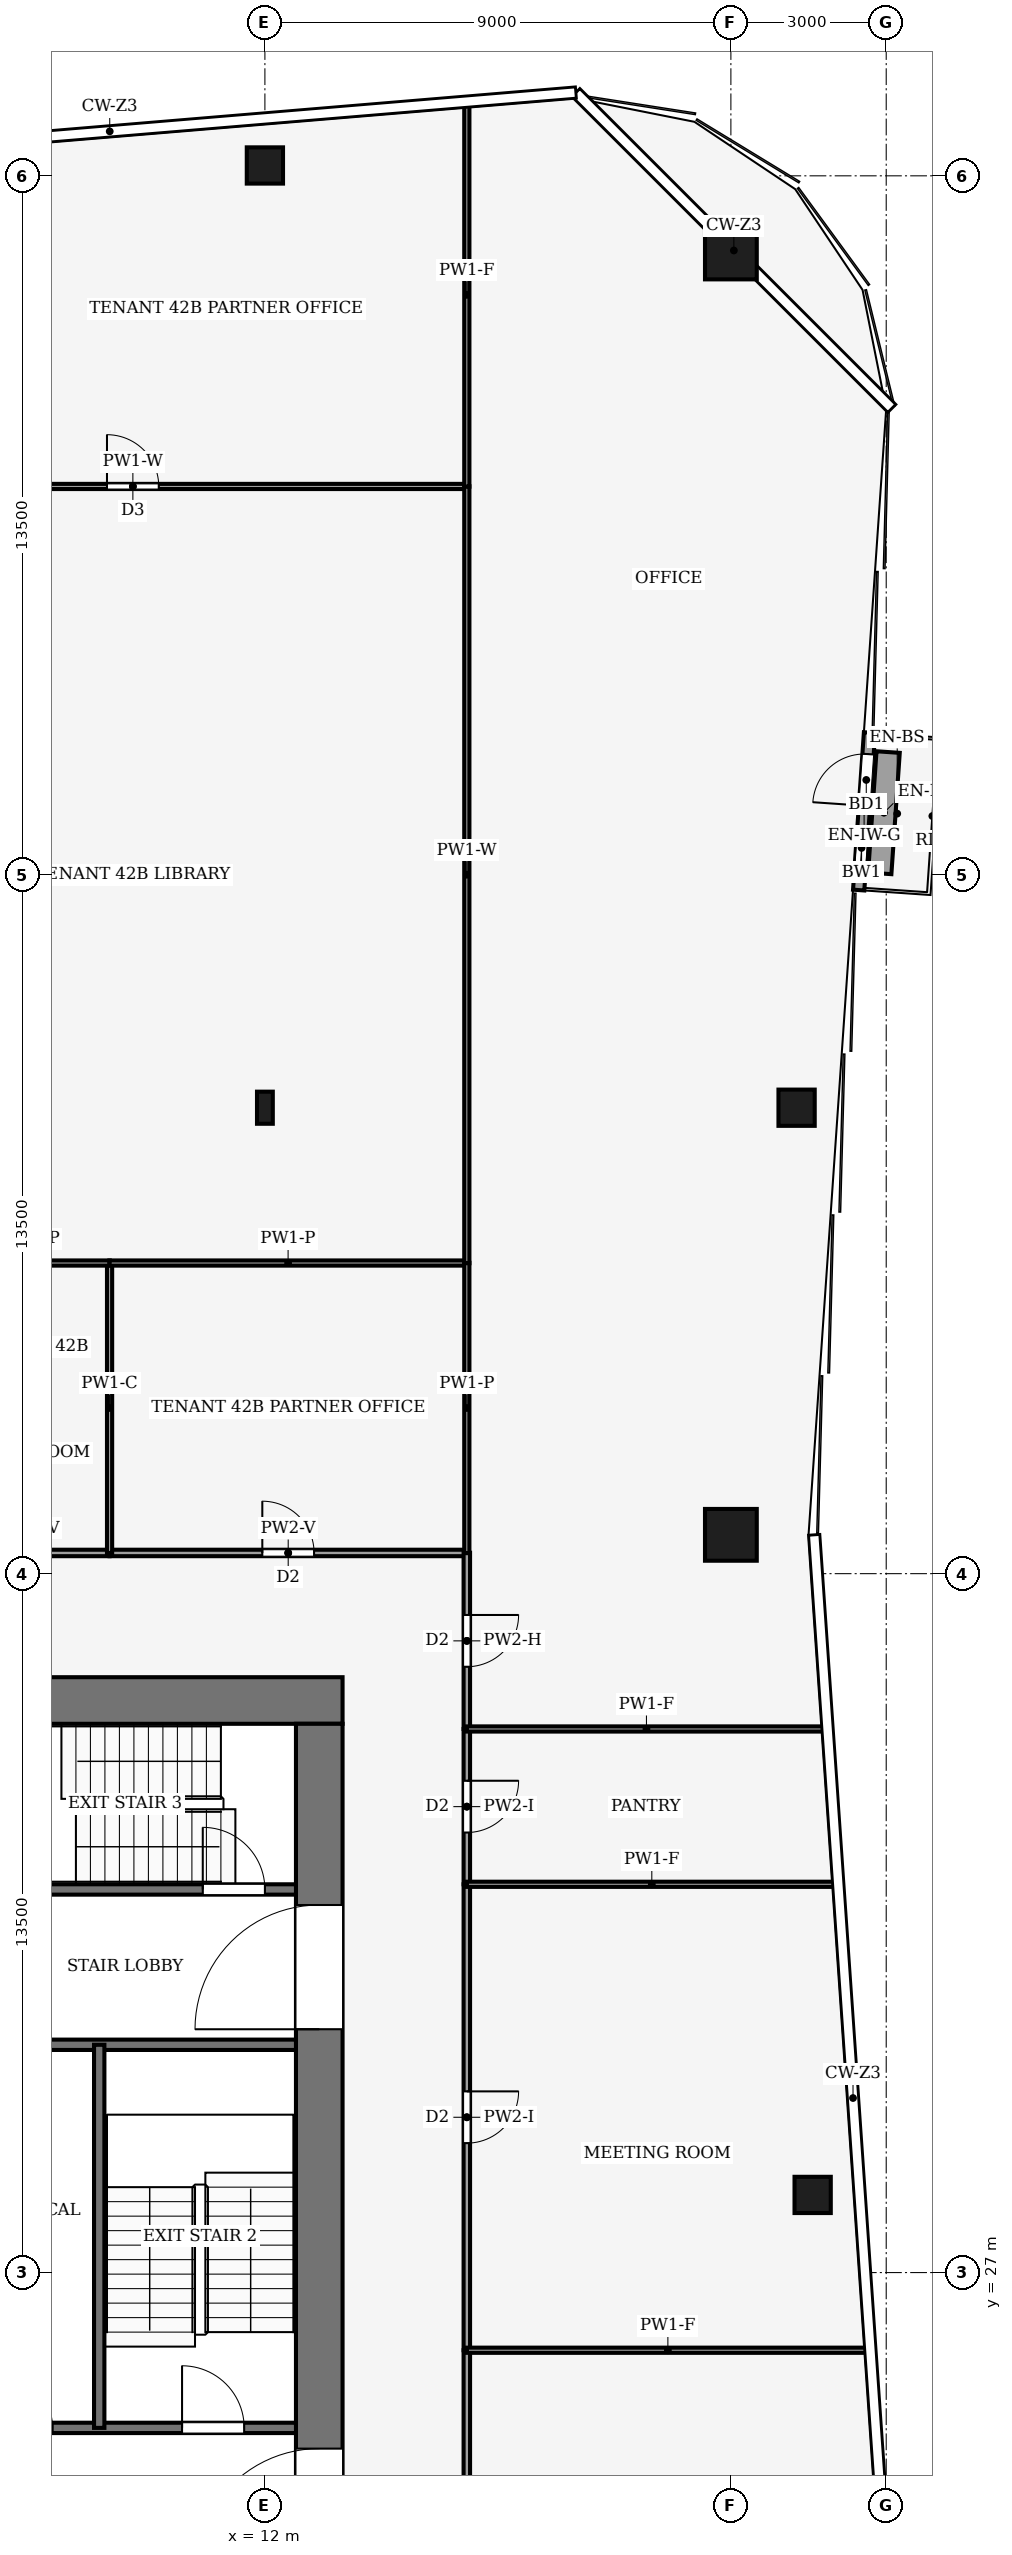
"""IFC4 building model, lengths in metres.
Left out: names, types, materials, properties, quantities, classifications, styles, units other than length and angle.
Written with IfcOpenShell. Run it as: python <this file> out.ifc"""

import sys

from ifc_helpers import new_model, si_unit, direction, frame, frame_2d, origin, origin_2d, place, context, subcontext, project, spatial, rectangle, hollow_rectangle, i_section, extrude, element, fill, save


model = new_model("IFC4")
c1 = context("Model", 3, precision=1e-05, world=origin(), true_north=direction((0.0, 1.0)))
c2 = subcontext(c1, "Body", "Model", "MODEL_VIEW")
j1 = project(units=[si_unit("LENGTHUNIT", "METRE"), si_unit("PLANEANGLEUNIT", "RADIAN")], contexts=[c1])
p1 = place(None, origin())
s1 = spatial("IfcSite", under=j1, at=p1, CompositionType="ELEMENT")
p2 = place(p1, origin())
s2 = spatial("IfcBuilding", under=s1, at=p2, CompositionType="ELEMENT")
p3 = place(p2, frame((0.0, 0.0, 186.0)))
s3 = spatial("IfcBuildingStorey", under=s2, at=p3, CompositionType="ELEMENT", Elevation=186.0)
p4 = place(p3, frame((-13.5, 38.05, -0.13), z_axis=(0.0, 0.0, 1.0), x_axis=(1.0, 0.0, 0.0)))
e1 = element("IfcWall", 1, at=p4, inside=s3, PredefinedType="SHEAR", context=c2, shape_type="SweptSolid", body=[
    extrude(rectangle(XDim=27.0, YDim=0.9, at=frame_2d((13.5, 0.0))), origin(), (0.0, 0.0, 1.0), 4.0),
])
p5 = place(p3, frame((13.05, 18.4, -0.13), z_axis=(0.0, 0.0, 1.0), x_axis=(0.0, 1.0, 0.0)))
e2 = element("IfcWall", 2, at=p5, inside=s3, PredefinedType="SHEAR", context=c2, shape_type="SweptSolid", body=[
    extrude(rectangle(XDim=19.2, YDim=0.9, at=frame_2d((9.6, 0.0))), origin(), (0.0, 0.0, 1.0), 4.0),
])
p6 = place(p5, frame((2.8, 0.0, 0.13)))
e3 = element("IfcOpeningElement", 3, at=p6, cuts=e2, PredefinedType="OPENING", context=c2, shape_type="SweptSolid", body=[
    extrude(rectangle(XDim=2.4, YDim=2.4, at=frame_2d((1.2, 1.2))), frame((0.0, 0.46, 0.0), z_axis=(0.0, -1.0, 0.0), x_axis=(1.0, 0.0, 0.0)), (0.0, 0.0, 1.0), 0.92),
])
p7 = place(p5, frame((13.3, 0.0, 0.13)))
e4 = element("IfcOpeningElement", 4, at=p7, cuts=e2, PredefinedType="OPENING", context=c2, shape_type="SweptSolid", body=[
    extrude(rectangle(XDim=2.4, YDim=2.4, at=frame_2d((1.2, 1.2))), frame((0.0, 0.46, 0.0), z_axis=(0.0, -1.0, 0.0), x_axis=(1.0, 0.0, 0.0)), (0.0, 0.0, 1.0), 0.92),
])
for number, where, z_axis, x_axis in (
    (5, (21.0, 66.0, 0.0), (0.0, 0.0, 1.0), (1.0, 0.0, 0.0)),
    (6, (21.0, 41.25, 0.0), (0.0, 0.0, 1.0), (1.0, 0.0, 0.0)),
):
    element("IfcColumn", number, at=place(p3, frame(where, z_axis=z_axis, x_axis=x_axis)), inside=s3, PredefinedType="COLUMN", context=c2, shape_type="SweptSolid", body=[
        extrude(hollow_rectangle(XDim=1.0, YDim=1.0, WallThickness=0.06, at=origin_2d()), origin(), (0.0, 0.0, 1.0), 4.0),
    ])
for number, where, z_axis, x_axis in (
    (7, (12.0, 67.7, 0.0), (0.0, 0.0, 1.0), (1.0, 0.0, 0.0)),
    (8, (22.579, 28.5, 0.0), (0.0, 0.0, 1.0), (1.0, 0.0, 0.0)),
    (9, (22.269, 49.5, 0.0), (0.0, 0.0, 1.0), (1.0, 0.0, 0.0)),
):
    element("IfcColumn", number, at=place(p3, frame(where, z_axis=z_axis, x_axis=x_axis)), inside=s3, PredefinedType="COLUMN", context=c2, shape_type="SweptSolid", body=[
        extrude(hollow_rectangle(XDim=0.7, YDim=0.7, WallThickness=0.03, at=origin_2d()), origin(), (0.0, 0.0, 1.0), 4.0),
    ])
p8 = place(p3, frame((12.0, 49.5, 0.0), z_axis=(0.0, 0.0, 1.0), x_axis=(1.0, 0.0, 0.0)))
e10 = element("IfcColumn", 10, at=p8, inside=s3, PredefinedType="COLUMN", context=c2, shape_type="SweptSolid", body=[
    extrude(i_section(OverallWidth=0.305, OverallDepth=0.62, WebThickness=0.021, FlangeThickness=0.04, FilletRadius=0.027, at=origin_2d()), origin(), (0.0, 0.0, 1.0), 4.0),
])
p9 = place(p3, frame((23.468, 53.704, 0.0), z_axis=(0.0, 0.0, 1.0), x_axis=(0.068793846076, 0.997630897047, 0.0)))
e11 = element("IfcWall", 11, at=p9, inside=s3, PredefinedType="SOLIDWALL", context=c2, shape_type="SweptSolid", body=[
    extrude(rectangle(XDim=3.049, YDim=0.218, at=frame_2d((1.524, 0.0))), origin(), (0.0, 0.0, 1.0), 3.65),
])
p10 = place(p9, frame((1.632, 0.0, 0.0)))
e12 = element("IfcOpeningElement", 12, at=p10, cuts=e11, PredefinedType="OPENING", context=c2, shape_type="SweptSolid", body=[
    extrude(rectangle(XDim=1.0, YDim=2.1, at=frame_2d((0.5, 1.05))), frame((0.0, 0.119, 0.0), z_axis=(0.0, -1.0, 0.0), x_axis=(1.0, 0.0, 0.0)), (0.0, 0.0, 1.0), 0.238),
])
p11 = place(p9, frame((0.416, 0.0, 0.9)))
e13 = element("IfcOpeningElement", 13, at=p11, cuts=e11, PredefinedType="OPENING", context=c2, shape_type="SweptSolid", body=[
    extrude(rectangle(XDim=0.8, YDim=1.2, at=frame_2d((0.4, 0.6))), frame((0.0, 0.119, 0.0), z_axis=(0.0, -1.0, 0.0), x_axis=(1.0, 0.0, 0.0)), (0.0, 0.0, 1.0), 0.238),
])
p12 = place(p3, frame((23.875, 54.027, 0.0), z_axis=(0.0, 0.0, 1.0), x_axis=(0.068823499363, 0.997628851796, 0.0)))
e14 = element("IfcWall", 14, at=p12, inside=s3, PredefinedType="USERDEFINED", context=c2, shape_type="SweptSolid", body=[
    extrude(rectangle(XDim=2.348, YDim=0.45, at=frame_2d((1.174, 0.0))), origin(), (0.0, 0.0, 1.0), 0.4),
])
p13 = place(p3, frame((6.0, 24.0, 0.0), z_axis=(0.0, 0.0, 1.0), x_axis=(1.0, 0.0, 0.0)))
e15 = element("IfcWall", 15, at=p13, inside=s3, PredefinedType="PARTITIONING", context=c2, shape_type="SweptSolid", body=[
    extrude(rectangle(XDim=6.6, YDim=0.2, at=frame_2d((3.3, 0.0))), origin(), (0.0, 0.0, 1.0), 3.87),
])
p14 = place(p13, frame((0.9, 0.0, 0.0)))
e16 = element("IfcOpeningElement", 16, at=p14, cuts=e15, PredefinedType="OPENING", context=c2, shape_type="SweptSolid", body=[
    extrude(rectangle(XDim=1.0, YDim=2.1, at=frame_2d((0.5, 1.05))), frame((0.0, 0.11, 0.0), z_axis=(0.0, -1.0, 0.0), x_axis=(1.0, 0.0, 0.0)), (0.0, 0.0, 1.0), 0.22),
])
p15 = place(p13, frame((4.4, 0.0, 0.0)))
e17 = element("IfcOpeningElement", 17, at=p15, cuts=e15, PredefinedType="OPENING", context=c2, shape_type="SweptSolid", body=[
    extrude(rectangle(XDim=1.2, YDim=2.2, at=frame_2d((0.6, 1.1))), frame((0.0, 0.11, 0.0), z_axis=(0.0, -1.0, 0.0), x_axis=(1.0, 0.0, 0.0)), (0.0, 0.0, 1.0), 0.22),
])
p16 = place(p3, frame((6.0, 31.4, 0.0), z_axis=(0.0, 0.0, 1.0), x_axis=(1.0, 0.0, 0.0)))
e18 = element("IfcWall", 18, at=p16, inside=s3, PredefinedType="PARTITIONING", context=c2, shape_type="SweptSolid", body=[
    extrude(rectangle(XDim=6.6, YDim=0.2, at=frame_2d((3.3, 0.0))), origin(), (0.0, 0.0, 1.0), 3.87),
])
p17 = place(p3, frame((6.0, 34.4, 0.0), z_axis=(0.0, 0.0, 1.0), x_axis=(1.0, 0.0, 0.0)))
e19 = element("IfcWall", 19, at=p17, inside=s3, PredefinedType="PARTITIONING", context=c2, shape_type="SweptSolid", body=[
    extrude(rectangle(XDim=6.6, YDim=0.2, at=frame_2d((3.3, 0.0))), origin(), (0.0, 0.0, 1.0), 3.87),
])
p18 = place(p17, frame((4.8, 0.0, 0.0)))
e20 = element("IfcOpeningElement", 20, at=p18, cuts=e19, PredefinedType="OPENING", context=c2, shape_type="SweptSolid", body=[
    extrude(rectangle(XDim=1.2, YDim=2.2, at=frame_2d((0.6, 1.1))), frame((0.0, 0.11, 0.0), z_axis=(0.0, -1.0, 0.0), x_axis=(1.0, 0.0, 0.0)), (0.0, 0.0, 1.0), 0.22),
])
p19 = place(p3, frame((8.8, 24.0, 0.0), z_axis=(0.0, 0.0, 1.0), x_axis=(0.0, 1.0, 0.0)))
e21 = element("IfcWall", 21, at=p19, inside=s3, PredefinedType="PARTITIONING", context=c2, shape_type="SweptSolid", body=[
    extrude(rectangle(XDim=7.4, YDim=0.2, at=frame_2d((3.7, 0.0))), origin(), (0.0, 0.0, 1.0), 3.87),
])
p20 = place(p3, frame((9.0, 40.9, 0.0), z_axis=(0.0, 0.0, 1.0), x_axis=(-1.0, 0.0, 0.0)))
e22 = element("IfcWall", 22, at=p20, inside=s3, PredefinedType="PARTITIONING", context=c2, shape_type="SweptSolid", body=[
    extrude(rectangle(XDim=3.0, YDim=0.125, at=frame_2d((1.5, 0.0))), origin(), (0.0, 0.0, 1.0), 3.44),
])
p21 = place(p3, frame((9.0, 40.9, 0.0), z_axis=(0.0, 0.0, 1.0), x_axis=(1.0, 0.0, 0.0)))
e23 = element("IfcWall", 23, at=p21, inside=s3, PredefinedType="PARTITIONING", context=c2, shape_type="SweptSolid", body=[
    extrude(rectangle(XDim=6.9, YDim=0.125, at=frame_2d((3.45, 0.0))), origin(), (0.0, 0.0, 1.0), 3.44),
])
p22 = place(p21, frame((2.95, 0.0, 0.0)))
e24 = element("IfcOpeningElement", 24, at=p22, cuts=e23, PredefinedType="OPENING", context=c2, shape_type="SweptSolid", body=[
    extrude(rectangle(XDim=1.0, YDim=2.1, at=frame_2d((0.5, 1.05))), frame((0.0, 0.073, 0.0), z_axis=(0.0, -1.0, 0.0), x_axis=(1.0, 0.0, 0.0)), (0.0, 0.0, 1.0), 0.145),
])
p23 = place(p3, frame((15.9, 25.5, 0.0), z_axis=(0.0, 0.0, 1.0), x_axis=(0.0, -1.0, 0.0)))
e25 = element("IfcWall", 25, at=p23, inside=s3, PredefinedType="PARTITIONING", context=c2, shape_type="SweptSolid", body=[
    extrude(rectangle(XDim=11.905, YDim=0.125, at=frame_2d((5.953, 0.0))), origin(), (0.0, 0.0, 1.0), 3.04),
])
p24 = place(p23, frame((5.387, 0.0, 0.0)))
e26 = element("IfcOpeningElement", 26, at=p24, cuts=e25, PredefinedType="OPENING", context=c2, shape_type="SweptSolid", body=[
    extrude(rectangle(XDim=1.0, YDim=2.1, at=frame_2d((0.5, 1.05))), frame((0.0, 0.073, 0.0), z_axis=(0.0, -1.0, 0.0), x_axis=(1.0, 0.0, 0.0)), (0.0, 0.0, 1.0), 0.145),
])
p25 = place(p3, frame((15.9, 34.5, 0.0), z_axis=(0.0, 0.0, 1.0), x_axis=(0.0, -1.0, 0.0)))
e27 = element("IfcWall", 27, at=p25, inside=s3, PredefinedType="PARTITIONING", context=c2, shape_type="SweptSolid", body=[
    extrude(rectangle(XDim=9.0, YDim=0.125, at=frame_2d((4.5, 0.0))), origin(), (0.0, 0.0, 1.0), 3.48),
])
p26 = place(p25, frame((4.0, 0.0, 0.0)))
e28 = element("IfcOpeningElement", 28, at=p26, cuts=e27, PredefinedType="OPENING", context=c2, shape_type="SweptSolid", body=[
    extrude(rectangle(XDim=1.0, YDim=2.1, at=frame_2d((0.5, 1.05))), frame((0.0, 0.073, 0.0), z_axis=(0.0, -1.0, 0.0), x_axis=(1.0, 0.0, 0.0)), (0.0, 0.0, 1.0), 0.145),
])
p27 = place(p3, frame((15.9, 37.5, 0.0), z_axis=(0.0, 0.0, 1.0), x_axis=(0.0, -1.0, 0.0)))
e29 = element("IfcWall", 29, at=p27, inside=s3, PredefinedType="PARTITIONING", context=c2, shape_type="SweptSolid", body=[
    extrude(rectangle(XDim=3.0, YDim=0.125, at=frame_2d((1.5, 0.0))), origin(), (0.0, 0.0, 1.0), 3.48),
])
p28 = place(p27, frame((1.0, 0.0, 0.0)))
e30 = element("IfcOpeningElement", 30, at=p28, cuts=e29, PredefinedType="OPENING", context=c2, shape_type="SweptSolid", body=[
    extrude(rectangle(XDim=1.0, YDim=2.1, at=frame_2d((0.5, 1.05))), frame((0.0, 0.073, 0.0), z_axis=(0.0, -1.0, 0.0), x_axis=(1.0, 0.0, 0.0)), (0.0, 0.0, 1.0), 0.145),
])
p29 = place(p3, frame((15.9, 40.904, 0.0), z_axis=(0.0, 0.0, 1.0), x_axis=(0.0, -1.0, 0.0)))
e31 = element("IfcWall", 31, at=p29, inside=s3, PredefinedType="PARTITIONING", context=c2, shape_type="SweptSolid", body=[
    extrude(rectangle(XDim=3.404, YDim=0.125, at=frame_2d((1.702, 0.0))), origin(), (0.0, 0.0, 1.0), 3.14),
])
p30 = place(p29, frame((1.202, 0.0, 0.0)))
e32 = element("IfcOpeningElement", 32, at=p30, cuts=e31, PredefinedType="OPENING", context=c2, shape_type="SweptSolid", body=[
    extrude(rectangle(XDim=1.0, YDim=2.1, at=frame_2d((0.5, 1.05))), frame((0.0, 0.073, 0.0), z_axis=(0.0, -1.0, 0.0), x_axis=(1.0, 0.0, 0.0)), (0.0, 0.0, 1.0), 0.145),
])
p31 = place(p3, frame((9.0, 40.9, 0.0), z_axis=(0.0, 0.0, 1.0), x_axis=(0.0, 1.0, 0.0)))
e33 = element("IfcWall", 33, at=p31, inside=s3, PredefinedType="PARTITIONING", context=c2, shape_type="SweptSolid", body=[
    extrude(rectangle(XDim=5.6, YDim=0.1, at=frame_2d((2.8, 0.0))), origin(), (0.0, 0.0, 1.0), 3.87),
])
p32 = place(p3, frame((9.004, 46.5, 0.0), z_axis=(0.0, 0.0, 1.0), x_axis=(-1.0, 0.0, 0.0)))
e34 = element("IfcWall", 34, at=p32, inside=s3, PredefinedType="PARTITIONING", context=c2, shape_type="SweptSolid", body=[
    extrude(rectangle(XDim=3.008, YDim=0.1, at=frame_2d((1.504, 0.0))), origin(), (0.0, 0.0, 1.0), 3.44),
])
p33 = place(p3, frame((15.9, 46.5, 0.0), z_axis=(0.0, 0.0, 1.0), x_axis=(-1.0, 0.0, 0.0)))
e35 = element("IfcWall", 35, at=p33, inside=s3, PredefinedType="PARTITIONING", context=c2, shape_type="SweptSolid", body=[
    extrude(rectangle(XDim=6.904, YDim=0.1, at=frame_2d((3.452, 0.0))), origin(), (0.0, 0.0, 1.0), 3.44),
])
p34 = place(p3, frame((15.9, 40.896, 0.0), z_axis=(0.0, 0.0, 1.0), x_axis=(0.0, 1.0, 0.0)))
e36 = element("IfcWall", 36, at=p34, inside=s3, PredefinedType="PARTITIONING", context=c2, shape_type="SweptSolid", body=[
    extrude(rectangle(XDim=5.608, YDim=0.1, at=frame_2d((2.804, 0.0))), origin(), (0.0, 0.0, 1.0), 3.44),
])
p35 = place(p3, frame((3.0, 61.5, 0.0), z_axis=(0.0, 0.0, 1.0), x_axis=(1.0, 0.0, 0.0)))
e37 = element("IfcWall", 37, at=p35, inside=s3, PredefinedType="PARTITIONING", context=c2, shape_type="SweptSolid", body=[
    extrude(rectangle(XDim=12.9, YDim=0.1, at=frame_2d((6.45, 0.0))), origin(), (0.0, 0.0, 1.0), 3.24),
])
p36 = place(p35, frame((5.95, 0.0, 0.0)))
e38 = element("IfcOpeningElement", 38, at=p36, cuts=e37, PredefinedType="OPENING", context=c2, shape_type="SweptSolid", body=[
    extrude(rectangle(XDim=1.0, YDim=2.1, at=frame_2d((0.5, 1.05))), frame((0.0, 0.06, 0.0), z_axis=(0.0, -1.0, 0.0), x_axis=(1.0, 0.0, 0.0)), (0.0, 0.0, 1.0), 0.12),
])
p37 = place(p3, frame((15.9, 46.496, 0.0), z_axis=(0.0, 0.0, 1.0), x_axis=(0.0, 1.0, 0.0)))
e39 = element("IfcWall", 39, at=p37, inside=s3, PredefinedType="PARTITIONING", context=c2, shape_type="SweptSolid", body=[
    extrude(rectangle(XDim=15.008, YDim=0.1, at=frame_2d((7.504, 0.0))), origin(), (0.0, 0.0, 1.0), 3.24),
])
p38 = place(p3, frame((15.9, 61.496, 0.0), z_axis=(0.0, 0.0, 1.0), x_axis=(0.0, 1.0, 0.0)))
e40 = element("IfcWall", 40, at=p38, inside=s3, PredefinedType="PARTITIONING", context=c2, shape_type="SweptSolid", body=[
    extrude(rectangle(XDim=7.409, YDim=0.1, at=frame_2d((3.705, 0.0))), origin(), (0.0, 0.0, 1.0), 3.04),
])
p39 = place(p3, frame((23.666, 25.5, 0.0), z_axis=(0.0, 0.0, 1.0), x_axis=(-1.0, 0.0, 0.0)))
e41 = element("IfcWall", 41, at=p39, inside=s3, PredefinedType="PARTITIONING", context=c2, shape_type="SweptSolid", body=[
    extrude(rectangle(XDim=7.766, YDim=0.1, at=frame_2d((3.883, 0.0))), origin(), (0.0, 0.0, 1.0), 3.04),
])
p40 = place(p3, frame((23.045, 34.5, 0.0), z_axis=(0.0, 0.0, 1.0), x_axis=(-1.0, 0.0, 0.0)))
e42 = element("IfcWall", 42, at=p40, inside=s3, PredefinedType="PARTITIONING", context=c2, shape_type="SweptSolid", body=[
    extrude(rectangle(XDim=7.146, YDim=0.1, at=frame_2d((3.573, 0.0))), origin(), (0.0, 0.0, 1.0), 3.04),
])
p41 = place(p3, frame((22.839, 37.5, 0.0), z_axis=(0.0, 0.0, 1.0), x_axis=(-1.0, 0.0, 0.0)))
e43 = element("IfcWall", 43, at=p41, inside=s3, PredefinedType="PARTITIONING", context=c2, shape_type="SweptSolid", body=[
    extrude(rectangle(XDim=6.939, YDim=0.1, at=frame_2d((3.469, 0.0))), origin(), (0.0, 0.0, 1.0), 3.04),
])
p42 = place(p10, origin())
e44 = element("IfcDoor", 44, at=p42, inside=s3, OperationType="SINGLE_SWING_RIGHT", PredefinedType="DOOR", context=c2, shape_type="SweptSolid", body=[
    extrude(rectangle(XDim=1.0, YDim=2.1, at=frame_2d((0.5, 1.05))), frame((0.0, 0.025, 0.0), z_axis=(0.0, -1.0, 0.0), x_axis=(1.0, 0.0, 0.0)), (0.0, 0.0, 1.0), 0.05),
])
fill(e12, e44)
p43 = place(p11, origin())
e45 = element("IfcWindow", 45, at=p43, inside=s3, PartitioningType="SINGLE_PANEL", PredefinedType="WINDOW", context=c2, shape_type="SweptSolid", body=[
    extrude(rectangle(XDim=0.8, YDim=1.2, at=frame_2d((0.4, 0.6))), frame((0.0, 0.03, 0.0), z_axis=(0.0, -1.0, 0.0), x_axis=(1.0, 0.0, 0.0)), (0.0, 0.0, 1.0), 0.06),
])
fill(e13, e45)
p44 = place(p15, origin())
e46 = element("IfcDoor", 46, at=p44, inside=s3, OperationType="SINGLE_SWING_LEFT", PredefinedType="DOOR", context=c2, shape_type="SweptSolid", body=[
    extrude(rectangle(XDim=1.2, YDim=2.2, at=frame_2d((0.6, 1.1))), frame((0.0, 0.025, 0.0), z_axis=(0.0, -1.0, 0.0), x_axis=(1.0, 0.0, 0.0)), (0.0, 0.0, 1.0), 0.05),
])
fill(e17, e46)
p45 = place(p18, origin())
e47 = element("IfcDoor", 47, at=p45, inside=s3, OperationType="SINGLE_SWING_RIGHT", PredefinedType="DOOR", context=c2, shape_type="SweptSolid", body=[
    extrude(rectangle(XDim=1.2, YDim=2.2, at=frame_2d((0.6, 1.1))), frame((0.0, 0.025, 0.0), z_axis=(0.0, -1.0, 0.0), x_axis=(1.0, 0.0, 0.0)), (0.0, 0.0, 1.0), 0.05),
])
fill(e20, e47)
p46 = place(p6, origin())
e48 = element("IfcDoor", 48, at=p46, inside=s3, OperationType="DOUBLE_DOOR_SINGLE_SWING", PredefinedType="DOOR", context=c2, shape_type="SweptSolid", body=[
    extrude(rectangle(XDim=2.4, YDim=2.4, at=frame_2d((1.2, 1.2))), frame((0.0, 0.025, 0.0), z_axis=(0.0, -1.0, 0.0), x_axis=(1.0, 0.0, 0.0)), (0.0, 0.0, 1.0), 0.05),
])
fill(e3, e48)
p47 = place(p7, origin())
e49 = element("IfcDoor", 49, at=p47, inside=s3, OperationType="DOUBLE_DOOR_SINGLE_SWING", PredefinedType="DOOR", context=c2, shape_type="SweptSolid", body=[
    extrude(rectangle(XDim=2.4, YDim=2.4, at=frame_2d((1.2, 1.2))), frame((0.0, 0.025, 0.0), z_axis=(0.0, -1.0, 0.0), x_axis=(1.0, 0.0, 0.0)), (0.0, 0.0, 1.0), 0.05),
])
fill(e4, e49)
p48 = place(p22, origin())
e50 = element("IfcDoor", 50, at=p48, inside=s3, OperationType="SINGLE_SWING_RIGHT", PredefinedType="DOOR", context=c2, shape_type="SweptSolid", body=[
    extrude(rectangle(XDim=1.0, YDim=2.1, at=frame_2d((0.5, 1.05))), frame((0.0, 0.025, 0.0), z_axis=(0.0, -1.0, 0.0), x_axis=(1.0, 0.0, 0.0)), (0.0, 0.0, 1.0), 0.05),
])
fill(e24, e50)
p49 = place(p26, origin())
e51 = element("IfcDoor", 51, at=p49, inside=s3, OperationType="SINGLE_SWING_LEFT", PredefinedType="DOOR", context=c2, shape_type="SweptSolid", body=[
    extrude(rectangle(XDim=1.0, YDim=2.1, at=frame_2d((0.5, 1.05))), frame((0.0, 0.025, 0.0), z_axis=(0.0, -1.0, 0.0), x_axis=(1.0, 0.0, 0.0)), (0.0, 0.0, 1.0), 0.05),
])
fill(e28, e51)
p50 = place(p28, origin())
e52 = element("IfcDoor", 52, at=p50, inside=s3, OperationType="SINGLE_SWING_RIGHT", PredefinedType="DOOR", context=c2, shape_type="SweptSolid", body=[
    extrude(rectangle(XDim=1.0, YDim=2.1, at=frame_2d((0.5, 1.05))), frame((0.0, 0.025, 0.0), z_axis=(0.0, -1.0, 0.0), x_axis=(1.0, 0.0, 0.0)), (0.0, 0.0, 1.0), 0.05),
])
fill(e30, e52)
p51 = place(p30, origin())
e53 = element("IfcDoor", 53, at=p51, inside=s3, OperationType="SINGLE_SWING_LEFT", PredefinedType="DOOR", context=c2, shape_type="SweptSolid", body=[
    extrude(rectangle(XDim=1.0, YDim=2.1, at=frame_2d((0.5, 1.05))), frame((0.0, 0.025, 0.0), z_axis=(0.0, -1.0, 0.0), x_axis=(1.0, 0.0, 0.0)), (0.0, 0.0, 1.0), 0.05),
])
fill(e32, e53)
p52 = place(p36, origin())
e54 = element("IfcDoor", 54, at=p52, inside=s3, OperationType="SINGLE_SWING_RIGHT", PredefinedType="DOOR", context=c2, shape_type="SweptSolid", body=[
    extrude(rectangle(XDim=1.0, YDim=2.1, at=frame_2d((0.5, 1.05))), frame((0.0, 0.025, 0.0), z_axis=(0.0, -1.0, 0.0), x_axis=(1.0, 0.0, 0.0)), (0.0, 0.0, 1.0), 0.05),
])
fill(e38, e54)
save(model, sys.argv[1])
